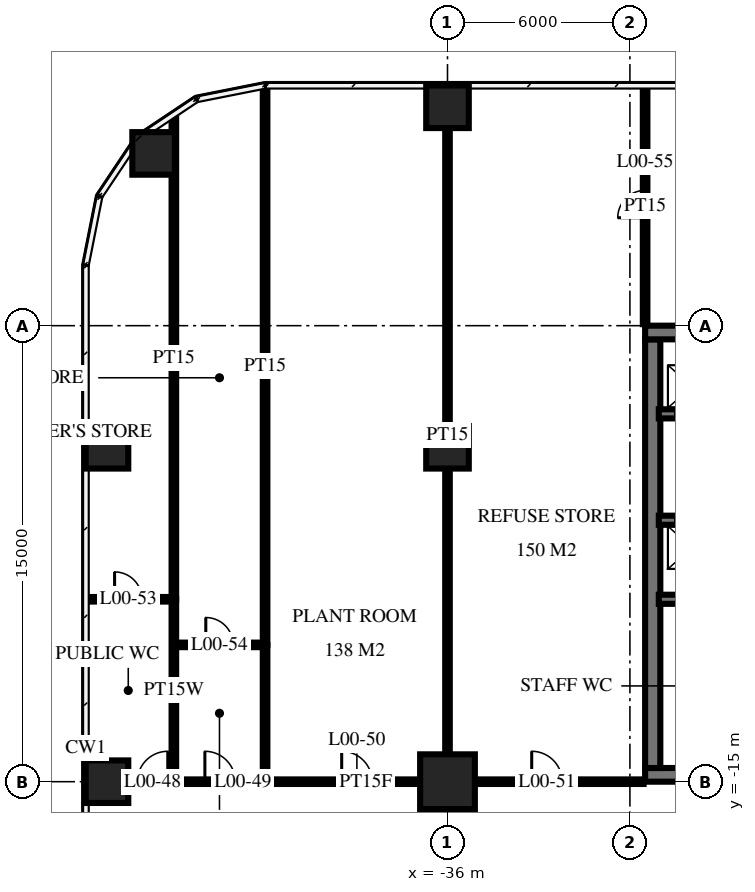
"""IFC4 building model, lengths in metres.
Left out: names, types, materials, properties, quantities, classifications, styles, units other than length and angle.
Written with IfcOpenShell. Run it as: python <this file> out.ifc"""

import sys

from ifc_helpers import new_model, si_unit, direction, frame, frame_2d, origin, origin_2d, place, context, subcontext, project, spatial, rectangle, circle, extrude, element, fill, save


model = new_model("IFC4")
c1 = context("Model", 3, precision=1e-05, world=origin(), true_north=direction((0.0, 1.0)))
c2 = subcontext(c1, "Body", "Model", "MODEL_VIEW")
j1 = project(units=[si_unit("LENGTHUNIT", "METRE"), si_unit("PLANEANGLEUNIT", "RADIAN")], contexts=[c1])
p1 = place(None, origin())
s1 = spatial("IfcSite", under=j1, at=p1, CompositionType="ELEMENT")
p2 = place(p1, origin())
s2 = spatial("IfcBuilding", under=s1, at=p2, CompositionType="ELEMENT")
p3 = place(p2, origin())
s3 = spatial("IfcBuildingStorey", under=s2, at=p3, CompositionType="ELEMENT", Elevation=0.0)
for number, where, z_axis, x_axis in (
    (1, (-47.2, -15.0, -0.3), (0.0, 0.0, 1.0), (1.0, 0.0, 0.0)),
    (2, (-47.2, -4.0, -0.3), (0.0, 0.0, 1.0), (1.0, 0.0, 0.0)),
    (3, (-45.666, 5.666, -0.3), (0.0, 0.0, 1.0), (1.0, 0.0, 0.0)),
):
    element("IfcColumn", number, at=place(p3, frame(where, z_axis=z_axis, x_axis=x_axis)), inside=s3, PredefinedType="COLUMN", context=c2, shape_type="SweptSolid", body=[
        extrude(circle(Radius=0.7, at=origin_2d()), origin(), (0.0, 0.0, 1.0), 7.3),
    ])
p4 = place(p3, frame((-36.0, -15.0, -0.3), z_axis=(0.0, 0.0, 1.0), x_axis=(1.0, 0.0, 0.0)))
e4 = element("IfcColumn", 4, at=p4, inside=s3, PredefinedType="COLUMN", context=c2, shape_type="SweptSolid", body=[
    extrude(circle(Radius=0.9, at=origin_2d()), origin(), (0.0, 0.0, 1.0), 7.3),
])
for number, where, z_axis, x_axis in (
    (5, (-36.0, -4.0, -0.3), (0.0, 0.0, 1.0), (1.0, 0.0, 0.0)),
    (6, (-36.0, 7.2, -0.3), (0.0, 0.0, 1.0), (1.0, 0.0, 0.0)),
):
    element("IfcColumn", number, at=place(p3, frame(where, z_axis=z_axis, x_axis=x_axis)), inside=s3, PredefinedType="COLUMN", context=c2, shape_type="SweptSolid", body=[
        extrude(circle(Radius=0.7, at=origin_2d()), origin(), (0.0, 0.0, 1.0), 7.3),
    ])
p5 = place(p3, frame((-29.5, -0.225, -0.3), z_axis=(0.0, 0.0, 1.0), x_axis=(1.0, 0.0, 0.0)))
e7 = element("IfcWall", 7, at=p5, inside=s3, PredefinedType="SHEAR", context=c2, shape_type="SweptSolid", body=[
    extrude(rectangle(XDim=19.5, YDim=0.45, at=frame_2d((9.75, 0.0))), origin(), (0.0, 0.0, 1.0), 7.3),
])
p6 = place(p3, frame((-29.5, -14.775, -0.3), z_axis=(0.0, 0.0, 1.0), x_axis=(1.0, 0.0, 0.0)))
e8 = element("IfcWall", 8, at=p6, inside=s3, PredefinedType="SHEAR", context=c2, shape_type="SweptSolid", body=[
    extrude(rectangle(XDim=19.5, YDim=0.45, at=frame_2d((9.75, 0.0))), origin(), (0.0, 0.0, 1.0), 7.3),
])
p7 = place(p6, frame((11.2, 0.0, 0.3)))
e9 = element("IfcOpeningElement", 9, at=p7, cuts=e8, PredefinedType="OPENING", context=c2, shape_type="SweptSolid", body=[
    extrude(rectangle(XDim=1.2, YDim=2.1, at=frame_2d((0.6, 1.05))), frame((0.0, 0.235, 0.0), z_axis=(0.0, -1.0, 0.0), x_axis=(1.0, 0.0, 0.0)), (0.0, 0.0, 1.0), 0.47),
])
p8 = place(p6, frame((14.25, 0.0, 0.3)))
e10 = element("IfcOpeningElement", 10, at=p8, cuts=e8, PredefinedType="OPENING", context=c2, shape_type="SweptSolid", body=[
    extrude(rectangle(XDim=1.1, YDim=2.1, at=frame_2d((0.55, 1.05))), frame((0.0, 0.235, 0.0), z_axis=(0.0, -1.0, 0.0), x_axis=(1.0, 0.0, 0.0)), (0.0, 0.0, 1.0), 0.47),
])
p9 = place(p6, frame((8.5, 0.0, 0.3)))
e11 = element("IfcOpeningElement", 11, at=p9, cuts=e8, PredefinedType="OPENING", context=c2, shape_type="SweptSolid", body=[
    extrude(rectangle(XDim=0.9, YDim=2.1, at=frame_2d((0.45, 1.05))), frame((0.0, 0.235, 0.0), z_axis=(0.0, -1.0, 0.0), x_axis=(1.0, 0.0, 0.0)), (0.0, 0.0, 1.0), 0.47),
])
p10 = place(p6, frame((6.05, 0.0, 0.3)))
e12 = element("IfcOpeningElement", 12, at=p10, cuts=e8, PredefinedType="OPENING", context=c2, shape_type="SweptSolid", body=[
    extrude(rectangle(XDim=1.0, YDim=2.1, at=frame_2d((0.5, 1.05))), frame((0.0, 0.235, 0.0), z_axis=(0.0, -1.0, 0.0), x_axis=(1.0, 0.0, 0.0)), (0.0, 0.0, 1.0), 0.47),
])
p11 = place(p6, frame((3.413, 0.0, 0.3)))
e13 = element("IfcOpeningElement", 13, at=p11, cuts=e8, PredefinedType="OPENING", context=c2, shape_type="SweptSolid", body=[
    extrude(rectangle(XDim=1.0, YDim=2.1, at=frame_2d((0.5, 1.05))), frame((0.0, 0.235, 0.0), z_axis=(0.0, -1.0, 0.0), x_axis=(1.0, 0.0, 0.0)), (0.0, 0.0, 1.0), 0.47),
])
p12 = place(p6, frame((1.087, 0.0, 0.3)))
e14 = element("IfcOpeningElement", 14, at=p12, cuts=e8, PredefinedType="OPENING", context=c2, shape_type="SweptSolid", body=[
    extrude(rectangle(XDim=1.0, YDim=2.1, at=frame_2d((0.5, 1.05))), frame((0.0, 0.235, 0.0), z_axis=(0.0, -1.0, 0.0), x_axis=(1.0, 0.0, 0.0)), (0.0, 0.0, 1.0), 0.47),
])
p13 = place(p3, frame((-29.25, -14.55, -0.3), z_axis=(0.0, 0.0, 1.0), x_axis=(0.0, 1.0, 0.0)))
e15 = element("IfcWall", 15, at=p13, inside=s3, PredefinedType="SHEAR", context=c2, shape_type="SweptSolid", body=[
    extrude(rectangle(XDim=14.1, YDim=0.5, at=frame_2d((7.05, 0.0))), origin(), (0.0, 0.0, 1.0), 7.3),
])
p14 = place(p3, frame((-29.05, -2.9, -0.3), z_axis=(0.0, 0.0, 1.0), x_axis=(1.0, 0.0, 0.0)))
e16 = element("IfcWall", 16, at=p14, inside=s3, PredefinedType="SHEAR", context=c2, shape_type="SweptSolid", body=[
    extrude(rectangle(XDim=18.7, YDim=0.3, at=frame_2d((9.35, 0.0))), origin(), (0.0, 0.0, 1.0), 7.3),
])
p15 = place(p14, frame((2.95, 0.0, 0.3)))
e17 = element("IfcOpeningElement", 17, at=p15, cuts=e16, PredefinedType="OPENING", context=c2, shape_type="SweptSolid", body=[
    extrude(rectangle(XDim=1.1, YDim=2.1, at=frame_2d((0.55, 1.05))), frame((0.0, 0.16, 0.0), z_axis=(0.0, -1.0, 0.0), x_axis=(1.0, 0.0, 0.0)), (0.0, 0.0, 1.0), 0.32),
])
p16 = place(p14, frame((0.55, 0.0, 0.3)))
e18 = element("IfcOpeningElement", 18, at=p16, cuts=e16, PredefinedType="OPENING", context=c2, shape_type="SweptSolid", body=[
    extrude(rectangle(XDim=1.1, YDim=2.1, at=frame_2d((0.55, 1.05))), frame((0.0, 0.16, 0.0), z_axis=(0.0, -1.0, 0.0), x_axis=(1.0, 0.0, 0.0)), (0.0, 0.0, 1.0), 0.32),
])
p17 = place(p14, frame((7.95, 0.0, 0.3)))
e19 = element("IfcOpeningElement", 19, at=p17, cuts=e16, PredefinedType="OPENING", context=c2, shape_type="SweptSolid", body=[
    extrude(rectangle(XDim=1.1, YDim=2.1, at=frame_2d((0.55, 1.05))), frame((0.0, 0.16, 0.0), z_axis=(0.0, -1.0, 0.0), x_axis=(1.0, 0.0, 0.0)), (0.0, 0.0, 1.0), 0.32),
])
p18 = place(p14, frame((10.9, 0.0, 0.3)))
e20 = element("IfcOpeningElement", 20, at=p18, cuts=e16, PredefinedType="OPENING", context=c2, shape_type="SweptSolid", body=[
    extrude(rectangle(XDim=0.9, YDim=2.1, at=frame_2d((0.45, 1.05))), frame((0.0, 0.16, 0.0), z_axis=(0.0, -1.0, 0.0), x_axis=(1.0, 0.0, 0.0)), (0.0, 0.0, 1.0), 0.32),
])
p19 = place(p14, frame((16.85, 0.0, 0.3)))
e21 = element("IfcOpeningElement", 21, at=p19, cuts=e16, PredefinedType="OPENING", context=c2, shape_type="SweptSolid", body=[
    extrude(rectangle(XDim=1.0, YDim=2.1, at=frame_2d((0.5, 1.05))), frame((0.0, 0.16, 0.0), z_axis=(0.0, -1.0, 0.0), x_axis=(1.0, 0.0, 0.0)), (0.0, 0.0, 1.0), 0.32),
])
p20 = place(p14, frame((13.85, 0.0, 0.3)))
e22 = element("IfcOpeningElement", 22, at=p20, cuts=e16, PredefinedType="OPENING", context=c2, shape_type="SweptSolid", body=[
    extrude(rectangle(XDim=1.0, YDim=2.1, at=frame_2d((0.5, 1.05))), frame((0.0, 0.16, 0.0), z_axis=(0.0, -1.0, 0.0), x_axis=(1.0, 0.0, 0.0)), (0.0, 0.0, 1.0), 0.32),
])
p21 = place(p14, frame((5.6, 0.0, 0.3)))
e23 = element("IfcOpeningElement", 23, at=p21, cuts=e16, PredefinedType="OPENING", context=c2, shape_type="SweptSolid", body=[
    extrude(rectangle(XDim=1.0, YDim=2.1, at=frame_2d((0.5, 1.05))), frame((0.0, 0.16, 0.0), z_axis=(0.0, -1.0, 0.0), x_axis=(1.0, 0.0, 0.0)), (0.0, 0.0, 1.0), 0.32),
])
p22 = place(p3, frame((-29.05, -6.4, -0.3), z_axis=(0.0, 0.0, 1.0), x_axis=(1.0, 0.0, 0.0)))
e24 = element("IfcWall", 24, at=p22, inside=s3, PredefinedType="SHEAR", context=c2, shape_type="SweptSolid", body=[
    extrude(rectangle(XDim=18.7, YDim=0.3, at=frame_2d((9.35, 0.0))), origin(), (0.0, 0.0, 1.0), 7.3),
])
p23 = place(p22, frame((2.95, 0.0, 0.3)))
e25 = element("IfcOpeningElement", 25, at=p23, cuts=e24, PredefinedType="OPENING", context=c2, shape_type="SweptSolid", body=[
    extrude(rectangle(XDim=1.1, YDim=2.1, at=frame_2d((0.55, 1.05))), frame((0.0, 0.16, 0.0), z_axis=(0.0, -1.0, 0.0), x_axis=(1.0, 0.0, 0.0)), (0.0, 0.0, 1.0), 0.32),
])
p24 = place(p22, frame((0.55, 0.0, 0.3)))
e26 = element("IfcOpeningElement", 26, at=p24, cuts=e24, PredefinedType="OPENING", context=c2, shape_type="SweptSolid", body=[
    extrude(rectangle(XDim=1.1, YDim=2.1, at=frame_2d((0.55, 1.05))), frame((0.0, 0.16, 0.0), z_axis=(0.0, -1.0, 0.0), x_axis=(1.0, 0.0, 0.0)), (0.0, 0.0, 1.0), 0.32),
])
p25 = place(p22, frame((7.95, 0.0, 0.3)))
e27 = element("IfcOpeningElement", 27, at=p25, cuts=e24, PredefinedType="OPENING", context=c2, shape_type="SweptSolid", body=[
    extrude(rectangle(XDim=1.1, YDim=2.1, at=frame_2d((0.55, 1.05))), frame((0.0, 0.16, 0.0), z_axis=(0.0, -1.0, 0.0), x_axis=(1.0, 0.0, 0.0)), (0.0, 0.0, 1.0), 0.32),
])
p26 = place(p22, frame((16.8, 0.0, 0.3)))
e28 = element("IfcOpeningElement", 28, at=p26, cuts=e24, PredefinedType="OPENING", context=c2, shape_type="SweptSolid", body=[
    extrude(rectangle(XDim=1.1, YDim=2.1, at=frame_2d((0.55, 1.05))), frame((0.0, 0.16, 0.0), z_axis=(0.0, -1.0, 0.0), x_axis=(1.0, 0.0, 0.0)), (0.0, 0.0, 1.0), 0.32),
])
p27 = place(p22, frame((10.8, 0.0, 0.3)))
e29 = element("IfcOpeningElement", 29, at=p27, cuts=e24, PredefinedType="OPENING", context=c2, shape_type="SweptSolid", body=[
    extrude(rectangle(XDim=1.1, YDim=2.1, at=frame_2d((0.55, 1.05))), frame((0.0, 0.16, 0.0), z_axis=(0.0, -1.0, 0.0), x_axis=(1.0, 0.0, 0.0)), (0.0, 0.0, 1.0), 0.32),
])
p28 = place(p22, frame((5.6, 0.0, 0.3)))
e30 = element("IfcOpeningElement", 30, at=p28, cuts=e24, PredefinedType="OPENING", context=c2, shape_type="SweptSolid", body=[
    extrude(rectangle(XDim=1.0, YDim=2.1, at=frame_2d((0.5, 1.05))), frame((0.0, 0.16, 0.0), z_axis=(0.0, -1.0, 0.0), x_axis=(1.0, 0.0, 0.0)), (0.0, 0.0, 1.0), 0.32),
])
p29 = place(p3, frame((-29.05, -9.0, -0.3), z_axis=(0.0, 0.0, 1.0), x_axis=(1.0, 0.0, 0.0)))
e31 = element("IfcWall", 31, at=p29, inside=s3, PredefinedType="SHEAR", context=c2, shape_type="SweptSolid", body=[
    extrude(rectangle(XDim=18.7, YDim=0.3, at=frame_2d((9.35, 0.0))), origin(), (0.0, 0.0, 1.0), 7.3),
])
p30 = place(p29, frame((13.8, 0.0, 0.3)))
e32 = element("IfcOpeningElement", 32, at=p30, cuts=e31, PredefinedType="OPENING", context=c2, shape_type="SweptSolid", body=[
    extrude(rectangle(XDim=1.1, YDim=2.1, at=frame_2d((0.55, 1.05))), frame((0.0, 0.16, 0.0), z_axis=(0.0, -1.0, 0.0), x_axis=(1.0, 0.0, 0.0)), (0.0, 0.0, 1.0), 0.32),
])
p31 = place(p3, frame((-29.5, 0.05, 0.0), z_axis=(0.0, 0.0, 1.0), x_axis=(0.0, 1.0, 0.0)))
e33 = element("IfcWall", 33, at=p31, inside=s3, PredefinedType="PARTITIONING", context=c2, shape_type="SweptSolid", body=[
    extrude(rectangle(XDim=7.77, YDim=0.15, at=frame_2d((3.885, 0.0))), origin(), (0.0, 0.0, 1.0), 6.55),
])
p32 = place(p31, frame((3.5, 0.0, 0.0)))
e34 = element("IfcOpeningElement", 34, at=p32, cuts=e33, PredefinedType="OPENING", context=c2, shape_type="SweptSolid", body=[
    extrude(rectangle(XDim=0.9, YDim=2.1, at=frame_2d((0.45, 1.05))), frame((0.0, 0.085, 0.0), z_axis=(0.0, -1.0, 0.0), x_axis=(1.0, 0.0, 0.0)), (0.0, 0.0, 1.0), 0.17),
])
p33 = place(p3, frame((-36.0, -15.0, 0.0), z_axis=(0.0, 0.0, 1.0), x_axis=(0.0, 1.0, 0.0)))
e35 = element("IfcWall", 35, at=p33, inside=s3, PredefinedType="PARTITIONING", context=c2, shape_type="SweptSolid", body=[
    extrude(rectangle(XDim=22.82, YDim=0.15, at=frame_2d((11.41, 0.0))), origin(), (0.0, 0.0, 1.0), 6.55),
])
p34 = place(p3, frame((-42.0, -10.5, 0.0), z_axis=(0.0, 0.0, 1.0), x_axis=(0.0, 1.0, 0.0)))
e36 = element("IfcWall", 36, at=p34, inside=s3, PredefinedType="PARTITIONING", context=c2, shape_type="SweptSolid", body=[
    extrude(rectangle(XDim=18.316, YDim=0.15, at=frame_2d((9.158, 0.0))), origin(), (0.0, 0.0, 1.0), 6.55),
])
p35 = place(p3, frame((-42.0, -15.0, 0.0), z_axis=(0.0, 0.0, 1.0), x_axis=(0.0, 1.0, 0.0)))
e37 = element("IfcWall", 37, at=p35, inside=s3, PredefinedType="PLUMBINGWALL", context=c2, shape_type="SweptSolid", body=[
    extrude(rectangle(XDim=4.5, YDim=0.15, at=frame_2d((2.25, 0.0))), origin(), (0.0, 0.0, 1.0), 6.55),
])
p36 = place(p3, frame((-45.0, -9.0, 0.0), z_axis=(0.0, 0.0, 1.0), x_axis=(0.0, 1.0, 0.0)))
e38 = element("IfcWall", 38, at=p36, inside=s3, PredefinedType="PARTITIONING", context=c2, shape_type="SweptSolid", body=[
    extrude(rectangle(XDim=15.856, YDim=0.15, at=frame_2d((7.928, 0.0))), origin(), (0.0, 0.0, 1.0), 6.55),
])
p37 = place(p3, frame((-45.0, -15.0, 0.0), z_axis=(0.0, 0.0, 1.0), x_axis=(0.0, 1.0, 0.0)))
e39 = element("IfcWall", 39, at=p37, inside=s3, PredefinedType="PLUMBINGWALL", context=c2, shape_type="SweptSolid", body=[
    extrude(rectangle(XDim=6.0, YDim=0.15, at=frame_2d((3.0, 0.0))), origin(), (0.0, 0.0, 1.0), 6.55),
])
p38 = place(p3, frame((-47.82, -15.0, 0.0), z_axis=(0.0, 0.0, 1.0), x_axis=(1.0, 0.0, 0.0)))
e40 = element("IfcWall", 40, at=p38, inside=s3, PredefinedType="PARTITIONING", context=c2, shape_type="SweptSolid", body=[
    extrude(rectangle(XDim=18.27, YDim=0.15, at=frame_2d((9.135, 0.0))), origin(), (0.0, 0.0, 1.0), 6.55),
])
p39 = place(p38, frame((1.62, 0.0, 0.0)))
e41 = element("IfcOpeningElement", 41, at=p39, cuts=e40, PredefinedType="OPENING", context=c2, shape_type="SweptSolid", body=[
    extrude(rectangle(XDim=1.0, YDim=2.1, at=frame_2d((0.5, 1.05))), frame((0.0, 0.085, 0.0), z_axis=(0.0, -1.0, 0.0), x_axis=(1.0, 0.0, 0.0)), (0.0, 0.0, 1.0), 0.17),
])
p40 = place(p38, frame((3.84, 0.0, 0.0)))
e42 = element("IfcOpeningElement", 42, at=p40, cuts=e40, PredefinedType="OPENING", context=c2, shape_type="SweptSolid", body=[
    extrude(rectangle(XDim=1.0, YDim=2.1, at=frame_2d((0.5, 1.05))), frame((0.0, 0.085, 0.0), z_axis=(0.0, -1.0, 0.0), x_axis=(1.0, 0.0, 0.0)), (0.0, 0.0, 1.0), 0.17),
])
p41 = place(p38, frame((8.34, 0.0, 0.0)))
e43 = element("IfcOpeningElement", 43, at=p41, cuts=e40, PredefinedType="OPENING", context=c2, shape_type="SweptSolid", body=[
    extrude(rectangle(XDim=1.0, YDim=2.1, at=frame_2d((0.5, 1.05))), frame((0.0, 0.085, 0.0), z_axis=(0.0, -1.0, 0.0), x_axis=(1.0, 0.0, 0.0)), (0.0, 0.0, 1.0), 0.17),
])
p42 = place(p38, frame((14.59, 0.0, 0.0)))
e44 = element("IfcOpeningElement", 44, at=p42, cuts=e40, PredefinedType="OPENING", context=c2, shape_type="SweptSolid", body=[
    extrude(rectangle(XDim=1.0, YDim=2.1, at=frame_2d((0.5, 1.05))), frame((0.0, 0.085, 0.0), z_axis=(0.0, -1.0, 0.0), x_axis=(1.0, 0.0, 0.0)), (0.0, 0.0, 1.0), 0.17),
])
p43 = place(p3, frame((-45.0, -10.5, 0.0), z_axis=(0.0, 0.0, 1.0), x_axis=(1.0, 0.0, 0.0)))
e45 = element("IfcWall", 45, at=p43, inside=s3, PredefinedType="PLUMBINGWALL", context=c2, shape_type="SweptSolid", body=[
    extrude(rectangle(XDim=3.0, YDim=0.15, at=frame_2d((1.5, 0.0))), origin(), (0.0, 0.0, 1.0), 6.55),
])
p44 = place(p43, frame((1.05, 0.0, 0.0)))
e46 = element("IfcOpeningElement", 46, at=p44, cuts=e45, PredefinedType="OPENING", context=c2, shape_type="SweptSolid", body=[
    extrude(rectangle(XDim=0.9, YDim=2.1, at=frame_2d((0.45, 1.05))), frame((0.0, 0.085, 0.0), z_axis=(0.0, -1.0, 0.0), x_axis=(1.0, 0.0, 0.0)), (0.0, 0.0, 1.0), 0.17),
])
p45 = place(p3, frame((-47.82, -9.0, 0.0), z_axis=(0.0, 0.0, 1.0), x_axis=(1.0, 0.0, 0.0)))
e47 = element("IfcWall", 47, at=p45, inside=s3, PredefinedType="PLUMBINGWALL", context=c2, shape_type="SweptSolid", body=[
    extrude(rectangle(XDim=2.82, YDim=0.15, at=frame_2d((1.41, 0.0))), origin(), (0.0, 0.0, 1.0), 6.55),
])
p46 = place(p45, frame((0.87, 0.0, 0.0)))
e48 = element("IfcOpeningElement", 48, at=p46, cuts=e47, PredefinedType="OPENING", context=c2, shape_type="SweptSolid", body=[
    extrude(rectangle(XDim=0.9, YDim=2.1, at=frame_2d((0.45, 1.05))), frame((0.0, 0.085, 0.0), z_axis=(0.0, -1.0, 0.0), x_axis=(1.0, 0.0, 0.0)), (0.0, 0.0, 1.0), 0.17),
])
p47 = place(p39, origin())
e49 = element("IfcDoor", 49, at=p47, inside=s3, OperationType="SINGLE_SWING_LEFT", PredefinedType="DOOR", context=c2, shape_type="SweptSolid", body=[
    extrude(rectangle(XDim=1.0, YDim=2.1, at=frame_2d((0.5, 1.05))), frame((0.0, 0.025, 0.0), z_axis=(0.0, -1.0, 0.0), x_axis=(1.0, 0.0, 0.0)), (0.0, 0.0, 1.0), 0.05),
])
fill(e41, e49)
p48 = place(p40, origin())
e50 = element("IfcDoor", 50, at=p48, inside=s3, OperationType="SINGLE_SWING_RIGHT", PredefinedType="DOOR", context=c2, shape_type="SweptSolid", body=[
    extrude(rectangle(XDim=1.0, YDim=2.1, at=frame_2d((0.5, 1.05))), frame((0.0, 0.025, 0.0), z_axis=(0.0, -1.0, 0.0), x_axis=(1.0, 0.0, 0.0)), (0.0, 0.0, 1.0), 0.05),
])
fill(e42, e50)
p49 = place(p41, origin())
e51 = element("IfcDoor", 51, at=p49, inside=s3, OperationType="SINGLE_SWING_RIGHT", PredefinedType="DOOR", context=c2, shape_type="SweptSolid", body=[
    extrude(rectangle(XDim=1.0, YDim=2.1, at=frame_2d((0.5, 1.05))), frame((0.0, 0.025, 0.0), z_axis=(0.0, -1.0, 0.0), x_axis=(1.0, 0.0, 0.0)), (0.0, 0.0, 1.0), 0.05),
])
fill(e43, e51)
p50 = place(p42, origin())
e52 = element("IfcDoor", 52, at=p50, inside=s3, OperationType="SINGLE_SWING_RIGHT", PredefinedType="DOOR", context=c2, shape_type="SweptSolid", body=[
    extrude(rectangle(XDim=1.0, YDim=2.1, at=frame_2d((0.5, 1.05))), frame((0.0, 0.025, 0.0), z_axis=(0.0, -1.0, 0.0), x_axis=(1.0, 0.0, 0.0)), (0.0, 0.0, 1.0), 0.05),
])
fill(e44, e52)
p51 = place(p46, origin())
e53 = element("IfcDoor", 53, at=p51, inside=s3, OperationType="SINGLE_SWING_RIGHT", PredefinedType="DOOR", context=c2, shape_type="SweptSolid", body=[
    extrude(rectangle(XDim=0.9, YDim=2.1, at=frame_2d((0.45, 1.05))), frame((0.0, 0.025, 0.0), z_axis=(0.0, -1.0, 0.0), x_axis=(1.0, 0.0, 0.0)), (0.0, 0.0, 1.0), 0.05),
])
fill(e48, e53)
p52 = place(p44, origin())
e54 = element("IfcDoor", 54, at=p52, inside=s3, OperationType="SINGLE_SWING_RIGHT", PredefinedType="DOOR", context=c2, shape_type="SweptSolid", body=[
    extrude(rectangle(XDim=0.9, YDim=2.1, at=frame_2d((0.45, 1.05))), frame((0.0, 0.025, 0.0), z_axis=(0.0, -1.0, 0.0), x_axis=(1.0, 0.0, 0.0)), (0.0, 0.0, 1.0), 0.05),
])
fill(e46, e54)
p53 = place(p32, origin())
e55 = element("IfcDoor", 55, at=p53, inside=s3, OperationType="SINGLE_SWING_RIGHT", PredefinedType="DOOR", context=c2, shape_type="SweptSolid", body=[
    extrude(rectangle(XDim=0.9, YDim=2.1, at=frame_2d((0.45, 1.05))), frame((0.0, 0.025, 0.0), z_axis=(0.0, -1.0, 0.0), x_axis=(1.0, 0.0, 0.0)), (0.0, 0.0, 1.0), 0.05),
])
fill(e34, e55)
save(model, sys.argv[1])
